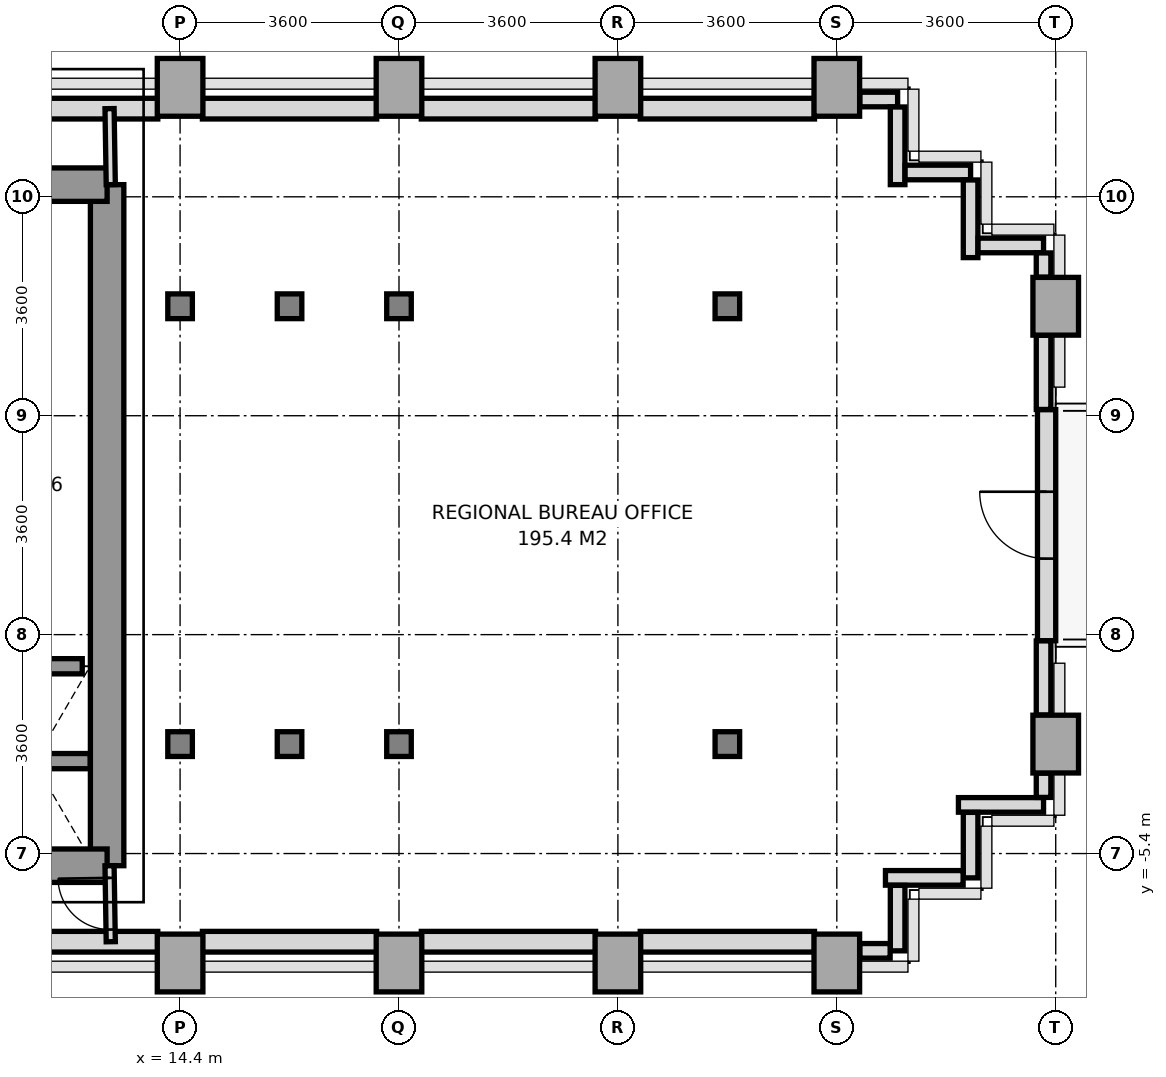
"""IFC4 building model, lengths in metres.
Left out: names, types, materials, properties, quantities, classifications, styles, units other than length and angle.
Written with IfcOpenShell. Run it as: python <this file> out.ifc"""

import sys

from ifc_helpers import new_model, si_unit, direction, frame, frame_2d, origin, origin_2d, place, context, subcontext, project, spatial, rectangle, i_section, extrude, source, transform, mapped, element, fill, save


model = new_model("IFC4")
c1 = context("Model", 3, precision=1e-05, world=origin(), true_north=direction((0.0, 1.0)))
c2 = subcontext(c1, "Body", "Model", "MODEL_VIEW")
j1 = project(units=[si_unit("LENGTHUNIT", "METRE"), si_unit("PLANEANGLEUNIT", "RADIAN")], contexts=[c1])
p1 = place(None, origin())
s1 = spatial("IfcSite", under=j1, at=p1, CompositionType="ELEMENT")
p2 = place(p1, origin())
s2 = spatial("IfcBuilding", under=s1, at=p2, CompositionType="ELEMENT")
p3 = place(p2, frame((0.0, 0.0, 44.2)))
s3 = spatial("IfcBuildingStorey", under=s2, at=p3, CompositionType="ELEMENT", Elevation=44.2)
m1 = source(origin(), c2, "Body", "SweptSolid", [
    extrude(rectangle(XDim=0.75, YDim=0.95, at=origin_2d()), origin(), (0.0, 0.0, 1.0), 3.2),
])
p4 = place(p3, frame((14.4, -7.2, 0.0), z_axis=(0.0, 0.0, 1.0), x_axis=(1.0, 0.0, 0.0)))
e1 = element("IfcColumn", 1, at=p4, inside=s3, PredefinedType="COLUMN", context=c2, shape_type="MappedRepresentation", body=[
    mapped(m1, transform((0.0, 0.0, 0.0), x_axis=(1.0, 0.0, 0.0), y_axis=(0.0, 1.0, 0.0), z_axis=(0.0, 0.0, 1.0), scale=1.0)),
])
m2 = source(origin(), c2, "Body", "SweptSolid", [
    extrude(i_section(OverallWidth=0.404, OverallDepth=0.407, WebThickness=0.022, FlangeThickness=0.035, at=origin_2d()), origin(), (0.0, 0.0, 1.0), 3.2),
])
for number, where, z_axis, x_axis in (
    (2, (14.4, -3.6, 0.0), (0.0, 0.0, 1.0), (1.0, 0.0, 0.0)),
    (3, (14.4, 3.6, 0.0), (0.0, 0.0, 1.0), (1.0, 0.0, 0.0)),
):
    element("IfcColumn", number, at=place(p3, frame(where, z_axis=z_axis, x_axis=x_axis)), inside=s3, PredefinedType="COLUMN", context=c2, shape_type="MappedRepresentation", body=[
        mapped(m2, transform((0.0, 0.0, 0.0), x_axis=(1.0, 0.0, 0.0), y_axis=(0.0, 1.0, 0.0), z_axis=(0.0, 0.0, 1.0), scale=1.0)),
    ])
p5 = place(p3, frame((14.4, 7.2, 0.0), z_axis=(0.0, 0.0, 1.0), x_axis=(1.0, 0.0, 0.0)))
e4 = element("IfcColumn", 4, at=p5, inside=s3, PredefinedType="COLUMN", context=c2, shape_type="MappedRepresentation", body=[
    mapped(m1, transform((0.0, 0.0, 0.0), x_axis=(1.0, 0.0, 0.0), y_axis=(0.0, 1.0, 0.0), z_axis=(0.0, 0.0, 1.0), scale=1.0)),
])
for number, where, z_axis, x_axis in (
    (5, (16.2, -3.6, 0.0), (0.0, 0.0, 1.0), (1.0, 0.0, 0.0)),
    (6, (16.2, 3.6, 0.0), (0.0, 0.0, 1.0), (1.0, 0.0, 0.0)),
):
    element("IfcColumn", number, at=place(p3, frame(where, z_axis=z_axis, x_axis=x_axis)), inside=s3, PredefinedType="COLUMN", context=c2, shape_type="MappedRepresentation", body=[
        mapped(m2, transform((0.0, 0.0, 0.0), x_axis=(1.0, 0.0, 0.0), y_axis=(0.0, 1.0, 0.0), z_axis=(0.0, 0.0, 1.0), scale=1.0)),
    ])
p6 = place(p3, frame((18.0, -7.2, 0.0), z_axis=(0.0, 0.0, 1.0), x_axis=(1.0, 0.0, 0.0)))
e7 = element("IfcColumn", 7, at=p6, inside=s3, PredefinedType="COLUMN", context=c2, shape_type="MappedRepresentation", body=[
    mapped(m1, transform((0.0, 0.0, 0.0), x_axis=(1.0, 0.0, 0.0), y_axis=(0.0, 1.0, 0.0), z_axis=(0.0, 0.0, 1.0), scale=1.0)),
])
for number, where, z_axis, x_axis in (
    (8, (18.0, -3.6, 0.0), (0.0, 0.0, 1.0), (1.0, 0.0, 0.0)),
    (9, (18.0, 3.6, 0.0), (0.0, 0.0, 1.0), (1.0, 0.0, 0.0)),
):
    element("IfcColumn", number, at=place(p3, frame(where, z_axis=z_axis, x_axis=x_axis)), inside=s3, PredefinedType="COLUMN", context=c2, shape_type="MappedRepresentation", body=[
        mapped(m2, transform((0.0, 0.0, 0.0), x_axis=(1.0, 0.0, 0.0), y_axis=(0.0, 1.0, 0.0), z_axis=(0.0, 0.0, 1.0), scale=1.0)),
    ])
for number, where, z_axis, x_axis in (
    (10, (18.0, 7.2, 0.0), (0.0, 0.0, 1.0), (1.0, 0.0, 0.0)),
    (11, (21.6, -7.2, 0.0), (0.0, 0.0, 1.0), (1.0, 0.0, 0.0)),
    (12, (21.6, 7.2, 0.0), (0.0, 0.0, 1.0), (1.0, 0.0, 0.0)),
):
    element("IfcColumn", number, at=place(p3, frame(where, z_axis=z_axis, x_axis=x_axis)), inside=s3, PredefinedType="COLUMN", context=c2, shape_type="MappedRepresentation", body=[
        mapped(m1, transform((0.0, 0.0, 0.0), x_axis=(1.0, 0.0, 0.0), y_axis=(0.0, 1.0, 0.0), z_axis=(0.0, 0.0, 1.0), scale=1.0)),
    ])
for number, where, z_axis, x_axis in (
    (13, (23.4, -3.6, 0.0), (0.0, 0.0, 1.0), (1.0, 0.0, 0.0)),
    (14, (23.4, 3.6, 0.0), (0.0, 0.0, 1.0), (1.0, 0.0, 0.0)),
):
    element("IfcColumn", number, at=place(p3, frame(where, z_axis=z_axis, x_axis=x_axis)), inside=s3, PredefinedType="COLUMN", context=c2, shape_type="MappedRepresentation", body=[
        mapped(m2, transform((0.0, 0.0, 0.0), x_axis=(1.0, 0.0, 0.0), y_axis=(0.0, 1.0, 0.0), z_axis=(0.0, 0.0, 1.0), scale=1.0)),
    ])
for number, where, z_axis, x_axis in (
    (15, (25.2, -7.2, 0.0), (0.0, 0.0, 1.0), (1.0, 0.0, 0.0)),
    (16, (25.2, 7.2, 0.0), (0.0, 0.0, 1.0), (1.0, 0.0, 0.0)),
    (17, (28.8, -3.6, 0.0), (0.0, 0.0, 1.0), (1.0, 0.0, 0.0)),
    (18, (28.8, 3.6, 0.0), (0.0, 0.0, 1.0), (1.0, 0.0, 0.0)),
):
    element("IfcColumn", number, at=place(p3, frame(where, z_axis=z_axis, x_axis=x_axis)), inside=s3, PredefinedType="COLUMN", context=c2, shape_type="MappedRepresentation", body=[
        mapped(m1, transform((0.0, 0.0, 0.0), x_axis=(1.0, 0.0, 0.0), y_axis=(0.0, 1.0, 0.0), z_axis=(0.0, 0.0, 1.0), scale=1.0)),
    ])
p7 = place(p3, frame((11.498, 6.85, 0.0), z_axis=(0.0, 0.0, 1.0), x_axis=(1.0, 0.0, 0.0)))
e19 = element("IfcWall", 19, at=p7, inside=s3, PredefinedType="SOLIDWALL", context=c2, shape_type="SweptSolid", body=[
    extrude(rectangle(XDim=2.535, YDim=0.34, at=frame_2d((1.268, 0.0))), origin(), (0.0, 0.0, 1.0), 3.2),
])
for number, where, z_axis, x_axis in (
    (20, (14.767, 6.85, 0.0), (0.0, 0.0, 1.0), (1.0, 0.0, 0.0)),
    (21, (18.367, 6.85, 0.0), (0.0, 0.0, 1.0), (1.0, 0.0, 0.0)),
    (22, (21.967, 6.85, 0.0), (0.0, 0.0, 1.0), (1.0, 0.0, 0.0)),
):
    element("IfcWall", number, at=place(p3, frame(where, z_axis=z_axis, x_axis=x_axis)), inside=s3, PredefinedType="SOLIDWALL", context=c2, shape_type="SweptSolid", body=[
        extrude(rectangle(XDim=2.866, YDim=0.34, at=frame_2d((1.433, 0.0))), origin(), (0.0, 0.0, 1.0), 2.45),
    ])
p8 = place(p3, frame((11.75, -6.85, 0.0), z_axis=(0.0, 0.0, 1.0), x_axis=(1.0, 0.0, 0.0)))
e23 = element("IfcWall", 23, at=p8, inside=s3, PredefinedType="SOLIDWALL", context=c2, shape_type="SweptSolid", body=[
    extrude(rectangle(XDim=2.283, YDim=0.34, at=frame_2d((1.142, 0.0))), origin(), (0.0, 0.0, 1.0), 3.2),
])
for number, where, z_axis, x_axis in (
    (24, (14.767, -6.85, 0.0), (0.0, 0.0, 1.0), (1.0, 0.0, 0.0)),
    (25, (18.367, -6.85, 0.0), (0.0, 0.0, 1.0), (1.0, 0.0, 0.0)),
    (26, (21.967, -6.85, 0.0), (0.0, 0.0, 1.0), (1.0, 0.0, 0.0)),
):
    element("IfcWall", number, at=place(p3, frame(where, z_axis=z_axis, x_axis=x_axis)), inside=s3, PredefinedType="SOLIDWALL", context=c2, shape_type="SweptSolid", body=[
        extrude(rectangle(XDim=2.866, YDim=0.34, at=frame_2d((1.433, 0.0))), origin(), (0.0, 0.0, 1.0), 2.45),
    ])
p9 = place(p3, frame((28.65, -1.9, 0.0), z_axis=(0.0, 0.0, 1.0), x_axis=(0.0, 1.0, 0.0)))
e27 = element("IfcWall", 27, at=p9, inside=s3, PredefinedType="SOLIDWALL", context=c2, shape_type="SweptSolid", body=[
    extrude(rectangle(XDim=3.8, YDim=0.3, at=frame_2d((1.9, 0.0))), origin(), (0.0, 0.0, 1.0), 2.45),
])
p10 = place(p9, frame((1.35, 0.0, 0.0)))
e28 = element("IfcOpeningElement", 28, at=p10, cuts=e27, PredefinedType="OPENING", context=c2, shape_type="SweptSolid", body=[
    extrude(rectangle(XDim=1.1, YDim=2.3, at=frame_2d((0.55, 1.15))), frame((0.0, 0.16, 0.0), z_axis=(0.0, -1.0, 0.0), x_axis=(1.0, 0.0, 0.0)), (0.0, 0.0, 1.0), 0.32),
])
p11 = place(p3, frame((28.6, -4.6, 0.0), z_axis=(0.0, 0.0, 1.0), x_axis=(-1.0, 0.0, 0.0)))
e29 = element("IfcWall", 29, at=p11, inside=s3, PredefinedType="PARAPET", context=c2, shape_type="SweptSolid", body=[
    extrude(rectangle(XDim=1.4, YDim=0.24, at=frame_2d((0.7, 0.0))), origin(), (0.0, 0.0, 1.0), 1.15),
])
p12 = place(p3, frame((27.4, -4.723, 0.0), z_axis=(0.0, 0.0, 1.0), x_axis=(0.0, -1.0, 0.0)))
e30 = element("IfcWall", 30, at=p12, inside=s3, PredefinedType="PARAPET", context=c2, shape_type="SweptSolid", body=[
    extrude(rectangle(XDim=1.077, YDim=0.24, at=frame_2d((0.539, 0.0))), origin(), (0.0, 0.0, 1.0), 1.15),
])
p13 = place(p3, frame((27.277, -5.8, 0.0), z_axis=(0.0, 0.0, 1.0), x_axis=(-1.0, 0.0, 0.0)))
e31 = element("IfcWall", 31, at=p13, inside=s3, PredefinedType="PARAPET", context=c2, shape_type="SweptSolid", body=[
    extrude(rectangle(XDim=1.277, YDim=0.24, at=frame_2d((0.639, 0.0))), origin(), (0.0, 0.0, 1.0), 1.15),
])
p14 = place(p3, frame((26.2, -5.923, 0.0), z_axis=(0.0, 0.0, 1.0), x_axis=(0.0, -1.0, 0.0)))
e32 = element("IfcWall", 32, at=p14, inside=s3, PredefinedType="PARAPET", context=c2, shape_type="SweptSolid", body=[
    extrude(rectangle(XDim=1.077, YDim=0.24, at=frame_2d((0.539, 0.0))), origin(), (0.0, 0.0, 1.0), 1.15),
])
p15 = place(p3, frame((26.077, -7.0, 0.0), z_axis=(0.0, 0.0, 1.0), x_axis=(-1.0, 0.0, 0.0)))
e33 = element("IfcWall", 33, at=p15, inside=s3, PredefinedType="PARAPET", context=c2, shape_type="SweptSolid", body=[
    extrude(rectangle(XDim=0.499, YDim=0.24, at=frame_2d((0.25, 0.0))), origin(), (0.0, 0.0, 1.0), 1.15),
])
p16 = place(p3, frame((25.578, 7.0, 0.0), z_axis=(0.0, 0.0, 1.0), x_axis=(1.0, 0.0, 0.0)))
e34 = element("IfcWall", 34, at=p16, inside=s3, PredefinedType="PARAPET", context=c2, shape_type="SweptSolid", body=[
    extrude(rectangle(XDim=0.622, YDim=0.24, at=frame_2d((0.311, 0.0))), origin(), (0.0, 0.0, 1.0), 1.15),
])
p17 = place(p3, frame((26.2, 6.877, 0.0), z_axis=(0.0, 0.0, 1.0), x_axis=(0.0, -1.0, 0.0)))
e35 = element("IfcWall", 35, at=p17, inside=s3, PredefinedType="PARAPET", context=c2, shape_type="SweptSolid", body=[
    extrude(rectangle(XDim=1.277, YDim=0.24, at=frame_2d((0.638, 0.0))), origin(), (0.0, 0.0, 1.0), 1.15),
])
p18 = place(p3, frame((26.323, 5.8, 0.0), z_axis=(0.0, 0.0, 1.0), x_axis=(1.0, 0.0, 0.0)))
e36 = element("IfcWall", 36, at=p18, inside=s3, PredefinedType="PARAPET", context=c2, shape_type="SweptSolid", body=[
    extrude(rectangle(XDim=1.077, YDim=0.24, at=frame_2d((0.539, 0.0))), origin(), (0.0, 0.0, 1.0), 1.15),
])
p19 = place(p3, frame((27.4, 5.677, 0.0), z_axis=(0.0, 0.0, 1.0), x_axis=(0.0, -1.0, 0.0)))
e37 = element("IfcWall", 37, at=p19, inside=s3, PredefinedType="PARAPET", context=c2, shape_type="SweptSolid", body=[
    extrude(rectangle(XDim=1.277, YDim=0.24, at=frame_2d((0.639, 0.0))), origin(), (0.0, 0.0, 1.0), 1.15),
])
p20 = place(p3, frame((27.523, 4.6, 0.0), z_axis=(0.0, 0.0, 1.0), x_axis=(1.0, 0.0, 0.0)))
e38 = element("IfcWall", 38, at=p20, inside=s3, PredefinedType="PARAPET", context=c2, shape_type="SweptSolid", body=[
    extrude(rectangle(XDim=1.077, YDim=0.24, at=frame_2d((0.539, 0.0))), origin(), (0.0, 0.0, 1.0), 1.15),
])
p21 = place(p3, frame((28.6, 4.477, 0.0), z_axis=(0.0, 0.0, 1.0), x_axis=(0.0, -1.0, 0.0)))
e39 = element("IfcWall", 39, at=p21, inside=s3, PredefinedType="PARAPET", context=c2, shape_type="SweptSolid", body=[
    extrude(rectangle(XDim=0.399, YDim=0.24, at=frame_2d((0.2, 0.0))), origin(), (0.0, 0.0, 1.0), 1.15),
])
for number, where, z_axis, x_axis in (
    (40, (28.6, 3.122, 0.0), (0.0, 0.0, 1.0), (0.0, -1.0, 0.0)),
    (41, (28.6, -1.903, 0.0), (0.0, 0.0, 1.0), (0.0, -1.0, 0.0)),
):
    element("IfcWall", number, at=place(p3, frame(where, z_axis=z_axis, x_axis=x_axis)), inside=s3, PredefinedType="PARAPET", context=c2, shape_type="SweptSolid", body=[
        extrude(rectangle(XDim=1.219, YDim=0.24, at=frame_2d((0.609, 0.0))), origin(), (0.0, 0.0, 1.0), 1.15),
    ])
p22 = place(p3, frame((28.6, -4.078, 0.0), z_axis=(0.0, 0.0, 1.0), x_axis=(0.0, -1.0, 0.0)))
e42 = element("IfcWall", 42, at=p22, inside=s3, PredefinedType="PARAPET", context=c2, shape_type="SweptSolid", body=[
    extrude(rectangle(XDim=0.399, YDim=0.24, at=frame_2d((0.2, 0.0))), origin(), (0.0, 0.0, 1.0), 1.15),
])
p23 = place(p3, frame((13.2, -5.6, 0.0), z_axis=(0.0, 0.0, 1.0), x_axis=(0.0, 1.0, 0.0)))
e43 = element("IfcWall", 43, at=p23, inside=s3, PredefinedType="SHEAR", context=c2, shape_type="SweptSolid", body=[
    extrude(rectangle(XDim=11.2, YDim=0.55, at=frame_2d((5.6, 0.0))), origin(), (0.0, 0.0, 1.0), 3.2),
])
p24 = place(p3, frame((11.381, 5.6, 0.0), z_axis=(0.0, 0.0, 1.0), x_axis=(1.0, 0.0, 0.0)))
e44 = element("IfcWall", 44, at=p24, inside=s3, PredefinedType="SHEAR", context=c2, shape_type="SweptSolid", body=[
    extrude(rectangle(XDim=1.819, YDim=0.55, at=frame_2d((0.909, 0.0))), origin(), (0.0, 0.0, 1.0), 3.2),
])
p25 = place(p3, frame((5.4, -5.6, 0.0), z_axis=(0.0, 0.0, 1.0), x_axis=(1.0, 0.0, 0.0)))
e45 = element("IfcWall", 45, at=p25, inside=s3, PredefinedType="SHEAR", context=c2, shape_type="SweptSolid", body=[
    extrude(rectangle(XDim=7.8, YDim=0.55, at=frame_2d((3.9, 0.0))), origin(), (0.0, 0.0, 1.0), 3.2),
])
p26 = place(p25, frame((3.0, 0.0, 0.0)))
e46 = element("IfcOpeningElement", 46, at=p26, cuts=e45, PredefinedType="OPENING", context=c2, shape_type="SweptSolid", body=[
    extrude(rectangle(XDim=1.2, YDim=2.2, at=frame_2d((0.6, 1.1))), frame((0.0, 0.285, 0.0), z_axis=(0.0, -1.0, 0.0), x_axis=(1.0, 0.0, 0.0)), (0.0, 0.0, 1.0), 0.57),
])
p27 = place(p3, frame((11.08, -3.88, 0.0), z_axis=(0.0, 0.0, 1.0), x_axis=(1.0, 0.0, 0.0)))
e47 = element("IfcWall", 47, at=p27, inside=s3, PredefinedType="SOLIDWALL", context=c2, shape_type="SweptSolid", body=[
    extrude(rectangle(XDim=1.84, YDim=0.25, at=frame_2d((0.92, 0.0))), origin(), (0.0, 0.0, 1.0), 3.2),
])
p28 = place(p3, frame((11.209, -2.32, 0.0), z_axis=(0.0, 0.0, 1.0), x_axis=(1.0, 0.0, 0.0)))
e48 = element("IfcWall", 48, at=p28, inside=s3, PredefinedType="SOLIDWALL", context=c2, shape_type="SweptSolid", body=[
    extrude(rectangle(XDim=1.582, YDim=0.25, at=frame_2d((0.791, 0.0))), origin(), (0.0, 0.0, 1.0), 3.2),
])
p29 = place(p3, frame((13.26, 5.6, 0.0), z_axis=(0.0, 0.0, 1.0), x_axis=(-0.016013571389, 0.999871774545, 0.0)))
e49 = element("IfcWall", 49, at=p29, inside=s3, PredefinedType="PARTITIONING", context=c2, shape_type="SweptSolid", body=[
    extrude(rectangle(XDim=1.25, YDim=0.15, at=frame_2d((0.625, 0.0))), origin(), (0.0, 0.0, 1.0), 3.2),
])
p30 = place(p3, frame((13.26, -6.85, 0.0), z_axis=(0.0, 0.0, 1.0), x_axis=(-0.016013571389, 0.999871774545, 0.0)))
e50 = element("IfcWall", 50, at=p30, inside=s3, PredefinedType="PARTITIONING", context=c2, shape_type="SweptSolid", body=[
    extrude(rectangle(XDim=1.25, YDim=0.15, at=frame_2d((0.625, 0.0))), origin(), (0.0, 0.0, 1.0), 3.2),
])
p31 = place(p30, frame((0.2, 0.0, 0.0)))
e51 = element("IfcOpeningElement", 51, at=p31, cuts=e50, PredefinedType="OPENING", context=c2, shape_type="SweptSolid", body=[
    extrude(rectangle(XDim=0.85, YDim=2.1, at=frame_2d((0.425, 1.05))), frame((0.0, 0.085, 0.0), z_axis=(0.0, -1.0, 0.0), x_axis=(1.0, 0.0, 0.0)), (0.0, 0.0, 1.0), 0.17),
])
m3 = source(origin(), c2, "Body", "SweptSolid", [
    extrude(rectangle(XDim=1.1, YDim=2.3, at=frame_2d((0.55, 1.15))), frame((0.0, 0.025, 0.0), z_axis=(0.0, -1.0, 0.0), x_axis=(1.0, 0.0, 0.0)), (0.0, 0.0, 1.0), 0.05),
])
p32 = place(p10, frame((1.1, 0.0, 0.0), z_axis=(0.0, 0.0, 1.0), x_axis=(-1.0, 0.0, 0.0)))
e52 = element("IfcDoor", 52, at=p32, inside=s3, OperationType="SINGLE_SWING_RIGHT", PredefinedType="DOOR", context=c2, shape_type="MappedRepresentation", body=[
    mapped(m3, transform((0.0, 0.0, 0.0), x_axis=(1.0, 0.0, 0.0), y_axis=(0.0, 1.0, 0.0), z_axis=(0.0, 0.0, 1.0), scale=1.0)),
])
fill(e28, e52)
m4 = source(origin(), c2, "Body", "SweptSolid", [
    extrude(rectangle(XDim=0.85, YDim=2.1, at=frame_2d((0.425, 1.05))), frame((0.0, 0.025, 0.0), z_axis=(0.0, -1.0, 0.0), x_axis=(1.0, 0.0, 0.0)), (0.0, 0.0, 1.0), 0.05),
])
p33 = place(p31, origin())
e53 = element("IfcDoor", 53, at=p33, inside=s3, OperationType="SINGLE_SWING_RIGHT", PredefinedType="DOOR", context=c2, shape_type="MappedRepresentation", body=[
    mapped(m4, transform((0.0, 0.0, 0.0), x_axis=(1.0, 0.0, 0.0), y_axis=(0.0, 1.0, 0.0), z_axis=(0.0, 0.0, 1.0), scale=1.0)),
])
fill(e51, e53)
save(model, sys.argv[1])
